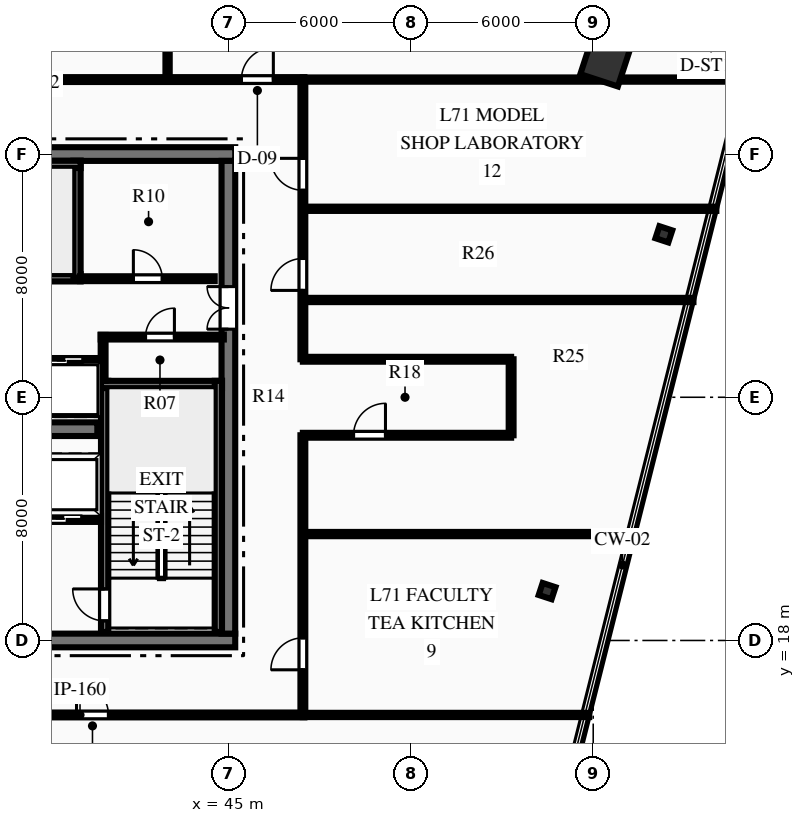
"""IFC4 building model, lengths in metres.
Left out: names, types, materials, properties, quantities, classifications, styles, units other than length and angle.
Written with IfcOpenShell. Run it as: python <this file> out.ifc"""

import sys

from ifc_helpers import new_model, si_unit, direction, frame, frame_2d, origin, origin_2d, place, context, subcontext, project, spatial, rectangle, hollow_rectangle, i_section, extrude, element, fill, save


model = new_model("IFC4")
c1 = context("Model", 3, precision=1e-05, world=origin(), true_north=direction((0.0, 1.0)))
c2 = subcontext(c1, "Body", "Model", "MODEL_VIEW")
j1 = project(units=[si_unit("LENGTHUNIT", "METRE"), si_unit("PLANEANGLEUNIT", "RADIAN")], contexts=[c1])
p1 = place(None, origin())
s1 = spatial("IfcSite", under=j1, at=p1, CompositionType="ELEMENT")
p2 = place(p1, origin())
s2 = spatial("IfcBuilding", under=s1, at=p2, CompositionType="ELEMENT")
p3 = place(p2, frame((0.0, 0.0, 282.45)))
s3 = spatial("IfcBuildingStorey", under=s2, at=p3, CompositionType="ELEMENT", Elevation=282.45)
p4 = place(p3, frame((26.775, 18.0, 0.0), z_axis=(0.0, 0.0, 1.0), x_axis=(1.0, 0.0, 0.0)))
e1 = element("IfcWall", 1, at=p4, inside=s3, PredefinedType="SHEAR", context=c2, shape_type="SweptSolid", body=[
    extrude(rectangle(XDim=18.45, YDim=0.45, at=frame_2d((9.225, 0.0))), origin(), (0.0, 0.0, 1.0), 3.75),
])
p5 = place(p4, frame((7.325, 0.0, 0.0)))
e2 = element("IfcOpeningElement", 2, at=p5, cuts=e1, PredefinedType="OPENING", context=c2, shape_type="SweptSolid", body=[
    extrude(rectangle(XDim=1.1, YDim=2.15, at=frame_2d((0.55, 1.075))), frame((0.0, 0.235, 0.0), z_axis=(0.0, -1.0, 0.0), x_axis=(1.0, 0.0, 0.0)), (0.0, 0.0, 1.0), 0.47),
])
p6 = place(p4, frame((10.025, 0.0, 0.0)))
e3 = element("IfcOpeningElement", 3, at=p6, cuts=e1, PredefinedType="OPENING", context=c2, shape_type="SweptSolid", body=[
    extrude(rectangle(XDim=1.1, YDim=2.15, at=frame_2d((0.55, 1.075))), frame((0.0, 0.235, 0.0), z_axis=(0.0, -1.0, 0.0), x_axis=(1.0, 0.0, 0.0)), (0.0, 0.0, 1.0), 0.47),
])
p7 = place(p3, frame((26.775, 34.0, 0.0), z_axis=(0.0, 0.0, 1.0), x_axis=(1.0, 0.0, 0.0)))
e4 = element("IfcWall", 4, at=p7, inside=s3, PredefinedType="SHEAR", context=c2, shape_type="SweptSolid", body=[
    extrude(rectangle(XDim=18.45, YDim=0.45, at=frame_2d((9.225, 0.0))), origin(), (0.0, 0.0, 1.0), 3.75),
])
p8 = place(p3, frame((45.0, 18.225, 0.0), z_axis=(0.0, 0.0, 1.0), x_axis=(0.0, 1.0, 0.0)))
e5 = element("IfcWall", 5, at=p8, inside=s3, PredefinedType="SHEAR", context=c2, shape_type="SweptSolid", body=[
    extrude(rectangle(XDim=15.55, YDim=0.45, at=frame_2d((7.775, 0.0))), origin(), (0.0, 0.0, 1.0), 3.75),
])
p9 = place(p8, frame((10.015, 0.0, 0.0)))
e6 = element("IfcOpeningElement", 6, at=p9, cuts=e5, PredefinedType="OPENING", context=c2, shape_type="SweptSolid", body=[
    extrude(rectangle(XDim=1.4, YDim=2.2, at=frame_2d((0.7, 1.1))), frame((0.0, 0.235, 0.0), z_axis=(0.0, -1.0, 0.0), x_axis=(1.0, 0.0, 0.0)), (0.0, 0.0, 1.0), 0.47),
])
p10 = place(p3, frame((31.31, 24.95, 0.0), z_axis=(0.0, 0.0, 1.0), x_axis=(1.0, 0.0, 0.0)))
e7 = element("IfcWall", 7, at=p10, inside=s3, PredefinedType="SHEAR", context=c2, shape_type="SweptSolid", body=[
    extrude(rectangle(XDim=9.38, YDim=0.45, at=frame_2d((4.69, 0.0))), origin(), (0.0, 0.0, 1.0), 3.75),
])
p11 = place(p3, frame((40.93, 18.28, 0.0), z_axis=(0.0, 0.0, 1.0), x_axis=(0.0, 1.0, 0.0)))
e8 = element("IfcWall", 8, at=p11, inside=s3, PredefinedType="SHEAR", context=c2, shape_type="SweptSolid", body=[
    extrude(rectangle(XDim=8.26, YDim=0.24, at=frame_2d((4.13, 0.0))), origin(), (0.0, 0.0, 1.0), 3.75),
])
p12 = place(p11, frame((0.365, 0.0, 0.0)))
e9 = element("IfcOpeningElement", 9, at=p12, cuts=e8, PredefinedType="OPENING", context=c2, shape_type="SweptSolid", body=[
    extrude(rectangle(XDim=1.05, YDim=2.15, at=frame_2d((0.525, 1.075))), frame((0.0, 0.13, 0.0), z_axis=(0.0, -1.0, 0.0), x_axis=(1.0, 0.0, 0.0)), (0.0, 0.0, 1.0), 0.26),
])
p13 = place(p3, frame((40.81, 26.42, 0.0), z_axis=(0.0, 0.0, 1.0), x_axis=(1.0, 0.0, 0.0)))
e10 = element("IfcWall", 10, at=p13, inside=s3, PredefinedType="SHEAR", context=c2, shape_type="SweptSolid", body=[
    extrude(rectangle(XDim=3.98, YDim=0.24, at=frame_2d((1.99, 0.0))), origin(), (0.0, 0.0, 1.0), 3.75),
])
p14 = place(p3, frame((44.67, 18.28, 0.0), z_axis=(0.0, 0.0, 1.0), x_axis=(0.0, 1.0, 0.0)))
e11 = element("IfcWall", 11, at=p14, inside=s3, PredefinedType="SHEAR", context=c2, shape_type="SweptSolid", body=[
    extrude(rectangle(XDim=8.26, YDim=0.24, at=frame_2d((4.13, 0.0))), origin(), (0.0, 0.0, 1.0), 3.75),
])
p15 = place(p3, frame((31.76, 29.93, 0.0), z_axis=(0.0, 0.0, 1.0), x_axis=(1.0, 0.0, 0.0)))
e12 = element("IfcWall", 12, at=p15, inside=s3, PredefinedType="SHEAR", context=c2, shape_type="SweptSolid", body=[
    extrude(rectangle(XDim=8.38, YDim=0.24, at=frame_2d((4.19, 0.0))), origin(), (0.0, 0.0, 1.0), 3.75),
])
p16 = place(p15, frame((0.565, 0.0, 0.0)))
e13 = element("IfcOpeningElement", 13, at=p16, cuts=e12, PredefinedType="OPENING", context=c2, shape_type="SweptSolid", body=[
    extrude(rectangle(XDim=1.05, YDim=2.15, at=frame_2d((0.525, 1.075))), frame((0.0, 0.13, 0.0), z_axis=(0.0, -1.0, 0.0), x_axis=(1.0, 0.0, 0.0)), (0.0, 0.0, 1.0), 0.26),
])
p17 = place(p3, frame((40.02, 29.93, 0.0), z_axis=(0.0, 0.0, 1.0), x_axis=(0.0, 1.0, 0.0)))
e14 = element("IfcWall", 14, at=p17, inside=s3, PredefinedType="SHEAR", context=c2, shape_type="SweptSolid", body=[
    extrude(rectangle(XDim=3.85, YDim=0.24, at=frame_2d((1.925, 0.0))), origin(), (0.0, 0.0, 1.0), 3.75),
])
p18 = place(p3, frame((37.85, 33.66, 0.0), z_axis=(0.0, 0.0, 1.0), x_axis=(1.0, 0.0, 0.0)))
e15 = element("IfcWall", 15, at=p18, inside=s3, PredefinedType="SHEAR", context=c2, shape_type="SweptSolid", body=[
    extrude(rectangle(XDim=2.29, YDim=0.24, at=frame_2d((1.145, 0.0))), origin(), (0.0, 0.0, 1.0), 3.75),
])
p19 = place(p3, frame((57.396, 37.043, 0.0), z_axis=(0.0, 0.0, 1.0), x_axis=(0.311008203279, 0.950407227189, 0.0)))
e16 = element("IfcColumn", 16, at=p19, inside=s3, PredefinedType="COLUMN", context=c2, shape_type="SweptSolid", body=[
    extrude(hollow_rectangle(XDim=1.3, YDim=1.3, WallThickness=0.06, at=origin_2d()), origin(), (0.0, 0.0, 1.0), 3.75),
])
for number, where, z_axis, x_axis in (
    (17, (55.483, 19.624, 0.0), (0.0, 0.0, 1.0), (0.311, 0.95, 0.0)),
    (18, (59.324, 31.36, 0.0), (0.0, 0.0, 1.0), (0.311, 0.95, 0.0)),
):
    element("IfcColumn", number, at=place(p3, frame(where, z_axis=z_axis, x_axis=x_axis)), inside=s3, PredefinedType="COLUMN", context=c2, shape_type="SweptSolid", body=[
        extrude(i_section(OverallWidth=0.416, OverallDepth=0.445, WebThickness=0.039, FlangeThickness=0.063, at=origin_2d()), origin(), (0.0, 0.0, 1.0), 3.75),
    ])
p20 = place(p3, frame((36.12, 22.0, 0.0), z_axis=(0.0, 0.0, 1.0), x_axis=(1.0, 0.0, 0.0)))
e19 = element("IfcWall", 19, at=p20, inside=s3, PredefinedType="PARTITIONING", context=c2, shape_type="SweptSolid", body=[
    extrude(rectangle(XDim=4.69, YDim=0.2, at=frame_2d((2.345, 0.0))), origin(), (0.0, 0.0, 1.0), 3.48),
])
p21 = place(p20, frame((2.955, 0.0, 0.0)))
e20 = element("IfcOpeningElement", 20, at=p21, cuts=e19, PredefinedType="OPENING", context=c2, shape_type="SweptSolid", body=[
    extrude(rectangle(XDim=1.1, YDim=2.15, at=frame_2d((0.55, 1.075))), frame((0.0, 0.11, 0.0), z_axis=(0.0, -1.0, 0.0), x_axis=(1.0, 0.0, 0.0)), (0.0, 0.0, 1.0), 0.22),
])
p22 = place(p20, frame((0.08, 0.0, 0.0)))
e21 = element("IfcOpeningElement", 21, at=p22, cuts=e19, PredefinedType="OPENING", context=c2, shape_type="SweptSolid", body=[
    extrude(rectangle(XDim=1.4, YDim=2.2, at=frame_2d((0.7, 1.1))), frame((0.0, 0.11, 0.0), z_axis=(0.0, -1.0, 0.0), x_axis=(1.0, 0.0, 0.0)), (0.0, 0.0, 1.0), 0.22),
])
p23 = place(p3, frame((40.8, 27.98, 0.0), z_axis=(0.0, 0.0, 1.0), x_axis=(1.0, 0.0, 0.0)))
e22 = element("IfcWall", 22, at=p23, inside=s3, PredefinedType="PARTITIONING", context=c2, shape_type="SweptSolid", body=[
    extrude(rectangle(XDim=4.05, YDim=0.16, at=frame_2d((2.025, 0.0))), origin(), (0.0, 0.0, 1.0), 3.48),
])
p24 = place(p23, frame((1.475, 0.0, 0.0)))
e23 = element("IfcOpeningElement", 23, at=p24, cuts=e22, PredefinedType="OPENING", context=c2, shape_type="SweptSolid", body=[
    extrude(rectangle(XDim=0.95, YDim=2.15, at=frame_2d((0.475, 1.075))), frame((0.0, 0.09, 0.0), z_axis=(0.0, -1.0, 0.0), x_axis=(1.0, 0.0, 0.0)), (0.0, 0.0, 1.0), 0.18),
])
p25 = place(p3, frame((40.88, 26.54, 0.0), z_axis=(0.0, 0.0, 1.0), x_axis=(0.0, 1.0, 0.0)))
e24 = element("IfcWall", 24, at=p25, inside=s3, PredefinedType="PARTITIONING", context=c2, shape_type="SweptSolid", body=[
    extrude(rectangle(XDim=1.51, YDim=0.16, at=frame_2d((0.755, 0.0))), origin(), (0.0, 0.0, 1.0), 3.48),
])
p26 = place(p3, frame((40.12, 29.9, 0.0), z_axis=(0.0, 0.0, 1.0), x_axis=(1.0, 0.0, 0.0)))
e25 = element("IfcWall", 25, at=p26, inside=s3, PredefinedType="PARTITIONING", context=c2, shape_type="SweptSolid", body=[
    extrude(rectangle(XDim=4.43, YDim=0.16, at=frame_2d((2.215, 0.0))), origin(), (0.0, 0.0, 1.0), 3.48),
])
p27 = place(p26, frame((1.755, 0.0, 0.0)))
e26 = element("IfcOpeningElement", 26, at=p27, cuts=e25, PredefinedType="OPENING", context=c2, shape_type="SweptSolid", body=[
    extrude(rectangle(XDim=0.95, YDim=2.15, at=frame_2d((0.475, 1.075))), frame((0.0, 0.09, 0.0), z_axis=(0.0, -1.0, 0.0), x_axis=(1.0, 0.0, 0.0)), (0.0, 0.0, 1.0), 0.18),
])
p28 = place(p3, frame((31.2, 27.2, 0.0), z_axis=(0.0, 0.0, 1.0), x_axis=(1.0, 0.0, 0.0)))
e27 = element("IfcWall", 27, at=p28, inside=s3, PredefinedType="PARTITIONING", context=c2, shape_type="SweptSolid", body=[
    extrude(rectangle(XDim=9.6, YDim=0.18, at=frame_2d((4.8, 0.0))), origin(), (0.0, 0.0, 1.0), 3.48),
])
p29 = place(p28, frame((0.59, 0.0, 0.0)))
e28 = element("IfcOpeningElement", 28, at=p29, cuts=e27, PredefinedType="OPENING", context=c2, shape_type="SweptSolid", body=[
    extrude(rectangle(XDim=1.1, YDim=2.15, at=frame_2d((0.55, 1.075))), frame((0.0, 0.1, 0.0), z_axis=(0.0, -1.0, 0.0), x_axis=(1.0, 0.0, 0.0)), (0.0, 0.0, 1.0), 0.2),
])
p30 = place(p28, frame((2.99, 0.0, 0.0)))
e29 = element("IfcOpeningElement", 29, at=p30, cuts=e27, PredefinedType="OPENING", context=c2, shape_type="SweptSolid", body=[
    extrude(rectangle(XDim=1.1, YDim=2.15, at=frame_2d((0.55, 1.075))), frame((0.0, 0.1, 0.0), z_axis=(0.0, -1.0, 0.0), x_axis=(1.0, 0.0, 0.0)), (0.0, 0.0, 1.0), 0.2),
])
p31 = place(p28, frame((5.51, 0.0, 0.0)))
e30 = element("IfcOpeningElement", 30, at=p31, cuts=e27, PredefinedType="OPENING", context=c2, shape_type="SweptSolid", body=[
    extrude(rectangle(XDim=1.1, YDim=2.15, at=frame_2d((0.55, 1.075))), frame((0.0, 0.1, 0.0), z_axis=(0.0, -1.0, 0.0), x_axis=(1.0, 0.0, 0.0)), (0.0, 0.0, 1.0), 0.2),
])
p32 = place(p28, frame((7.91, 0.0, 0.0)))
e31 = element("IfcOpeningElement", 31, at=p32, cuts=e27, PredefinedType="OPENING", context=c2, shape_type="SweptSolid", body=[
    extrude(rectangle(XDim=1.1, YDim=2.15, at=frame_2d((0.55, 1.075))), frame((0.0, 0.1, 0.0), z_axis=(0.0, -1.0, 0.0), x_axis=(1.0, 0.0, 0.0)), (0.0, 0.0, 1.0), 0.2),
])
p33 = place(p3, frame((37.25, 15.55, 0.0), z_axis=(0.0, 0.0, 1.0), x_axis=(1.0, 0.0, 0.0)))
e32 = element("IfcWall", 32, at=p33, inside=s3, PredefinedType="PARTITIONING", context=c2, shape_type="SweptSolid", body=[
    extrude(rectangle(XDim=10.25, YDim=0.16, at=frame_2d((5.125, 0.0))), origin(), (0.0, 0.0, 1.0), 3.48),
])
p34 = place(p33, frame((2.755, 0.0, 0.0)))
e33 = element("IfcOpeningElement", 33, at=p34, cuts=e32, PredefinedType="OPENING", context=c2, shape_type="SweptSolid", body=[
    extrude(rectangle(XDim=1.05, YDim=2.15, at=frame_2d((0.525, 1.075))), frame((0.0, 0.09, 0.0), z_axis=(0.0, -1.0, 0.0), x_axis=(1.0, 0.0, 0.0)), (0.0, 0.0, 1.0), 0.18),
])
p35 = place(p3, frame((37.25, 36.45, 0.0), z_axis=(0.0, 0.0, 1.0), x_axis=(1.0, 0.0, 0.0)))
e34 = element("IfcWall", 34, at=p35, inside=s3, PredefinedType="PARTITIONING", context=c2, shape_type="SweptSolid", body=[
    extrude(rectangle(XDim=10.25, YDim=0.16, at=frame_2d((5.125, 0.0))), origin(), (0.0, 0.0, 1.0), 3.48),
])
p36 = place(p35, frame((8.179, 0.0, 0.0)))
e35 = element("IfcOpeningElement", 35, at=p36, cuts=e34, PredefinedType="OPENING", context=c2, shape_type="SweptSolid", body=[
    extrude(rectangle(XDim=1.05, YDim=2.15, at=frame_2d((0.525, 1.075))), frame((0.0, 0.09, 0.0), z_axis=(0.0, -1.0, 0.0), x_axis=(1.0, 0.0, 0.0)), (0.0, 0.0, 1.0), 0.18),
])
p37 = place(p3, frame((47.45, 15.55, 0.0), z_axis=(0.0, 0.0, 1.0), x_axis=(0.0, 1.0, 0.0)))
e36 = element("IfcWall", 36, at=p37, inside=s3, PredefinedType="PARTITIONING", context=c2, shape_type="SweptSolid", body=[
    extrude(rectangle(XDim=9.2, YDim=0.16, at=frame_2d((4.6, 0.0))), origin(), (0.0, 0.0, 1.0), 3.48),
])
p38 = place(p37, frame((1.485, 0.0, 0.0)))
e37 = element("IfcOpeningElement", 37, at=p38, cuts=e36, PredefinedType="OPENING", context=c2, shape_type="SweptSolid", body=[
    extrude(rectangle(XDim=1.05, YDim=2.15, at=frame_2d((0.525, 1.075))), frame((0.0, 0.09, 0.0), z_axis=(0.0, -1.0, 0.0), x_axis=(1.0, 0.0, 0.0)), (0.0, 0.0, 1.0), 0.18),
])
p39 = place(p3, frame((47.45, 27.25, 0.0), z_axis=(0.0, 0.0, 1.0), x_axis=(0.0, 1.0, 0.0)))
e38 = element("IfcWall", 38, at=p39, inside=s3, PredefinedType="PARTITIONING", context=c2, shape_type="SweptSolid", body=[
    extrude(rectangle(XDim=9.2, YDim=0.16, at=frame_2d((4.6, 0.0))), origin(), (0.0, 0.0, 1.0), 3.48),
])
p40 = place(p39, frame((2.265, 0.0, 0.0)))
e39 = element("IfcOpeningElement", 39, at=p40, cuts=e38, PredefinedType="OPENING", context=c2, shape_type="SweptSolid", body=[
    extrude(rectangle(XDim=1.05, YDim=2.15, at=frame_2d((0.525, 1.075))), frame((0.0, 0.09, 0.0), z_axis=(0.0, -1.0, 0.0), x_axis=(1.0, 0.0, 0.0)), (0.0, 0.0, 1.0), 0.18),
])
p41 = place(p39, frame((5.559, 0.0, 0.0)))
e40 = element("IfcOpeningElement", 40, at=p41, cuts=e38, PredefinedType="OPENING", context=c2, shape_type="SweptSolid", body=[
    extrude(rectangle(XDim=1.05, YDim=2.15, at=frame_2d((0.525, 1.075))), frame((0.0, 0.09, 0.0), z_axis=(0.0, -1.0, 0.0), x_axis=(1.0, 0.0, 0.0)), (0.0, 0.0, 1.0), 0.18),
])
p42 = place(p3, frame((47.45, 24.75, 0.0), z_axis=(0.0, 0.0, 1.0), x_axis=(1.0, 0.0, 0.0)))
e41 = element("IfcWall", 41, at=p42, inside=s3, PredefinedType="PARTITIONING", context=c2, shape_type="SweptSolid", body=[
    extrude(rectangle(XDim=6.85, YDim=0.16, at=frame_2d((3.425, 0.0))), origin(), (0.0, 0.0, 1.0), 3.48),
])
p43 = place(p42, frame((1.667, 0.0, 0.0)))
e42 = element("IfcOpeningElement", 42, at=p43, cuts=e41, PredefinedType="OPENING", context=c2, shape_type="SweptSolid", body=[
    extrude(rectangle(XDim=1.05, YDim=2.15, at=frame_2d((0.525, 1.075))), frame((0.0, 0.09, 0.0), z_axis=(0.0, -1.0, 0.0), x_axis=(1.0, 0.0, 0.0)), (0.0, 0.0, 1.0), 0.18),
])
p44 = place(p3, frame((47.45, 27.25, 0.0), z_axis=(0.0, 0.0, 1.0), x_axis=(1.0, 0.0, 0.0)))
e43 = element("IfcWall", 43, at=p44, inside=s3, PredefinedType="PARTITIONING", context=c2, shape_type="SweptSolid", body=[
    extrude(rectangle(XDim=6.85, YDim=0.16, at=frame_2d((3.425, 0.0))), origin(), (0.0, 0.0, 1.0), 3.48),
])
p45 = place(p3, frame((54.3, 24.75, 0.0), z_axis=(0.0, 0.0, 1.0), x_axis=(0.0, 1.0, 0.0)))
e44 = element("IfcWall", 44, at=p45, inside=s3, PredefinedType="PARTITIONING", context=c2, shape_type="SweptSolid", body=[
    extrude(rectangle(XDim=2.5, YDim=0.16, at=frame_2d((1.25, 0.0))), origin(), (0.0, 0.0, 1.0), 3.48),
])
p46 = place(p3, frame((47.45, 15.55, 0.0), z_axis=(0.0, 0.0, 1.0), x_axis=(1.0, 0.0, 0.0)))
e45 = element("IfcWall", 45, at=p46, inside=s3, PredefinedType="PARTITIONING", context=c2, shape_type="SweptSolid", body=[
    extrude(rectangle(XDim=9.418, YDim=0.14, at=frame_2d((4.709, 0.0))), origin(), (0.0, 0.0, 1.0), 3.48),
])
p47 = place(p3, frame((47.45, 36.45, 0.0), z_axis=(0.0, 0.0, 1.0), x_axis=(1.0, 0.0, 0.0)))
e46 = element("IfcWall", 46, at=p47, inside=s3, PredefinedType="PARTITIONING", context=c2, shape_type="SweptSolid", body=[
    extrude(rectangle(XDim=14.668, YDim=0.14, at=frame_2d((7.334, 0.0))), origin(), (0.0, 0.0, 1.0), 2.858),
])
p48 = place(p3, frame((43.0, 36.45, 0.0), z_axis=(0.0, 0.0, 1.0), x_axis=(0.0, 1.0, 0.0)))
e47 = element("IfcWall", 47, at=p48, inside=s3, PredefinedType="PARTITIONING", context=c2, shape_type="SweptSolid", body=[
    extrude(rectangle(XDim=11.517, YDim=0.14, at=frame_2d((5.758, 0.0))), origin(), (0.0, 0.0, 1.0), 2.858),
])
p49 = place(p3, frame((47.45, 21.5, 0.0), z_axis=(0.0, 0.0, 1.0), x_axis=(1.0, 0.0, 0.0)))
e48 = element("IfcWall", 48, at=p49, inside=s3, PredefinedType="PARTITIONING", context=c2, shape_type="SweptSolid", body=[
    extrude(rectangle(XDim=10.912, YDim=0.14, at=frame_2d((5.456, 0.0))), origin(), (0.0, 0.0, 1.0), 3.48),
])
p50 = place(p3, frame((47.45, 29.2, 0.0), z_axis=(0.0, 0.0, 1.0), x_axis=(1.0, 0.0, 0.0)))
e49 = element("IfcWall", 49, at=p50, inside=s3, PredefinedType="PARTITIONING", context=c2, shape_type="SweptSolid", body=[
    extrude(rectangle(XDim=12.847, YDim=0.14, at=frame_2d((6.423, 0.0))), origin(), (0.0, 0.0, 1.0), 3.48),
])
p51 = place(p3, frame((47.45, 32.2, 0.0), z_axis=(0.0, 0.0, 1.0), x_axis=(1.0, 0.0, 0.0)))
e50 = element("IfcWall", 50, at=p51, inside=s3, PredefinedType="PARTITIONING", context=c2, shape_type="SweptSolid", body=[
    extrude(rectangle(XDim=13.6, YDim=0.14, at=frame_2d((6.8, 0.0))), origin(), (0.0, 0.0, 1.0), 3.48),
])
p52 = place(p24, origin())
e51 = element("IfcDoor", 51, at=p52, inside=s3, OperationType="SINGLE_SWING_RIGHT", PredefinedType="DOOR", context=c2, shape_type="SweptSolid", body=[
    extrude(rectangle(XDim=0.95, YDim=2.15, at=frame_2d((0.475, 1.075))), frame((0.0, 0.025, 0.0), z_axis=(0.0, -1.0, 0.0), x_axis=(1.0, 0.0, 0.0)), (0.0, 0.0, 1.0), 0.05),
])
fill(e23, e51)
p53 = place(p27, origin())
e52 = element("IfcDoor", 52, at=p53, inside=s3, OperationType="SINGLE_SWING_LEFT", PredefinedType="DOOR", context=c2, shape_type="SweptSolid", body=[
    extrude(rectangle(XDim=0.95, YDim=2.15, at=frame_2d((0.475, 1.075))), frame((0.0, 0.025, 0.0), z_axis=(0.0, -1.0, 0.0), x_axis=(1.0, 0.0, 0.0)), (0.0, 0.0, 1.0), 0.05),
])
fill(e26, e52)
p54 = place(p12, origin())
e53 = element("IfcDoor", 53, at=p54, inside=s3, OperationType="SINGLE_SWING_RIGHT", PredefinedType="DOOR", context=c2, shape_type="SweptSolid", body=[
    extrude(rectangle(XDim=1.05, YDim=2.15, at=frame_2d((0.525, 1.075))), frame((0.0, 0.025, 0.0), z_axis=(0.0, -1.0, 0.0), x_axis=(1.0, 0.0, 0.0)), (0.0, 0.0, 1.0), 0.05),
])
fill(e9, e53)
p55 = place(p9, origin())
e54 = element("IfcDoor", 54, at=p55, inside=s3, OperationType="DOUBLE_DOOR_SINGLE_SWING", PredefinedType="DOOR", context=c2, shape_type="SweptSolid", body=[
    extrude(rectangle(XDim=1.4, YDim=2.2, at=frame_2d((0.7, 1.1))), frame((0.0, 0.025, 0.0), z_axis=(0.0, -1.0, 0.0), x_axis=(1.0, 0.0, 0.0)), (0.0, 0.0, 1.0), 0.05),
])
fill(e6, e54)
p56 = place(p34, origin())
e55 = element("IfcDoor", 55, at=p56, inside=s3, OperationType="SINGLE_SWING_LEFT", PredefinedType="DOOR", context=c2, shape_type="SweptSolid", body=[
    extrude(rectangle(XDim=1.05, YDim=2.15, at=frame_2d((0.525, 1.075))), frame((0.0, 0.025, 0.0), z_axis=(0.0, -1.0, 0.0), x_axis=(1.0, 0.0, 0.0)), (0.0, 0.0, 1.0), 0.05),
])
fill(e33, e55)
p57 = place(p36, origin())
e56 = element("IfcDoor", 56, at=p57, inside=s3, OperationType="SINGLE_SWING_RIGHT", PredefinedType="DOOR", context=c2, shape_type="SweptSolid", body=[
    extrude(rectangle(XDim=1.05, YDim=2.15, at=frame_2d((0.525, 1.075))), frame((0.0, 0.025, 0.0), z_axis=(0.0, -1.0, 0.0), x_axis=(1.0, 0.0, 0.0)), (0.0, 0.0, 1.0), 0.05),
])
fill(e35, e56)
p58 = place(p38, origin())
e57 = element("IfcDoor", 57, at=p58, inside=s3, OperationType="SINGLE_SWING_LEFT", PredefinedType="DOOR", context=c2, shape_type="SweptSolid", body=[
    extrude(rectangle(XDim=1.05, YDim=2.15, at=frame_2d((0.525, 1.075))), frame((0.0, 0.025, 0.0), z_axis=(0.0, -1.0, 0.0), x_axis=(1.0, 0.0, 0.0)), (0.0, 0.0, 1.0), 0.05),
])
fill(e37, e57)
p59 = place(p43, origin())
e58 = element("IfcDoor", 58, at=p59, inside=s3, OperationType="SINGLE_SWING_RIGHT", PredefinedType="DOOR", context=c2, shape_type="SweptSolid", body=[
    extrude(rectangle(XDim=1.05, YDim=2.15, at=frame_2d((0.525, 1.075))), frame((0.0, 0.025, 0.0), z_axis=(0.0, -1.0, 0.0), x_axis=(1.0, 0.0, 0.0)), (0.0, 0.0, 1.0), 0.05),
])
fill(e42, e58)
p60 = place(p40, origin())
e59 = element("IfcDoor", 59, at=p60, inside=s3, OperationType="SINGLE_SWING_LEFT", PredefinedType="DOOR", context=c2, shape_type="SweptSolid", body=[
    extrude(rectangle(XDim=1.05, YDim=2.15, at=frame_2d((0.525, 1.075))), frame((0.0, 0.025, 0.0), z_axis=(0.0, -1.0, 0.0), x_axis=(1.0, 0.0, 0.0)), (0.0, 0.0, 1.0), 0.05),
])
fill(e39, e59)
p61 = place(p41, origin())
e60 = element("IfcDoor", 60, at=p61, inside=s3, OperationType="SINGLE_SWING_RIGHT", PredefinedType="DOOR", context=c2, shape_type="SweptSolid", body=[
    extrude(rectangle(XDim=1.05, YDim=2.15, at=frame_2d((0.525, 1.075))), frame((0.0, 0.025, 0.0), z_axis=(0.0, -1.0, 0.0), x_axis=(1.0, 0.0, 0.0)), (0.0, 0.0, 1.0), 0.05),
])
fill(e40, e60)
p62 = place(p32, origin())
e61 = element("IfcDoor", 61, at=p62, inside=s3, OperationType="SLIDING_TO_LEFT", PredefinedType="DOOR", context=c2, shape_type="SweptSolid", body=[
    extrude(rectangle(XDim=1.1, YDim=2.15, at=frame_2d((0.55, 1.075))), frame((0.0, 0.025, 0.0), z_axis=(0.0, -1.0, 0.0), x_axis=(1.0, 0.0, 0.0)), (0.0, 0.0, 1.0), 0.05),
])
fill(e31, e61)
p63 = place(p21, origin())
e62 = element("IfcDoor", 62, at=p63, inside=s3, OperationType="SLIDING_TO_LEFT", PredefinedType="DOOR", context=c2, shape_type="SweptSolid", body=[
    extrude(rectangle(XDim=1.1, YDim=2.15, at=frame_2d((0.55, 1.075))), frame((0.0, 0.025, 0.0), z_axis=(0.0, -1.0, 0.0), x_axis=(1.0, 0.0, 0.0)), (0.0, 0.0, 1.0), 0.05),
])
fill(e20, e62)
save(model, sys.argv[1])
